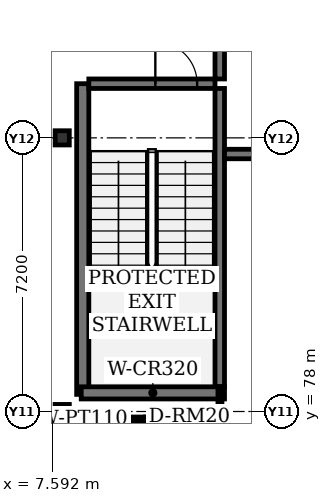
"""IFC4 building model, lengths in metres.
Left out: names, types, materials, properties, quantities, classifications, styles, units other than length and angle.
Written with IfcOpenShell. Run it as: python <this file> out.ifc"""

import sys

from ifc_helpers import new_model, si_unit, direction, frame, frame_2d, origin, origin_2d, place, context, subcontext, project, spatial, rectangle, i_section, extrude, element, fill, save


model = new_model("IFC4")
c1 = context("Model", 3, precision=1e-05, world=origin(), true_north=direction((0.0, 1.0)))
c2 = subcontext(c1, "Body", "Model", "MODEL_VIEW")
j1 = project(units=[si_unit("LENGTHUNIT", "METRE"), si_unit("PLANEANGLEUNIT", "RADIAN")], contexts=[c1])
p1 = place(None, origin())
s1 = spatial("IfcSite", under=j1, at=p1, CompositionType="ELEMENT")
p2 = place(p1, origin())
s2 = spatial("IfcBuilding", under=s1, at=p2, CompositionType="ELEMENT")
p3 = place(p2, frame((0.0, 0.0, 22.5)))
s3 = spatial("IfcBuildingStorey", under=s2, at=p3, CompositionType="ELEMENT", Elevation=22.5)
for number, where, z_axis, x_axis in (
    (1, (7.85, 78.0, 0.0), (0.0, 0.0, 1.0), (1.0, 0.0, 0.0)),
    (2, (7.85, 85.2, 0.0), (0.0, 0.0, 1.0), (0.0, 1.0, 0.0)),
):
    element("IfcColumn", number, at=place(p3, frame(where, z_axis=z_axis, x_axis=x_axis)), inside=s3, PredefinedType="COLUMN", context=c2, shape_type="SweptSolid", body=[
        extrude(i_section(OverallWidth=0.374, OverallDepth=0.372, WebThickness=0.016, FlangeThickness=0.026, FilletRadius=0.015, at=origin_2d()), origin(), (0.0, 0.0, 1.0), 4.2),
    ])
p4 = place(p3, frame((8.39, 78.45, 0.0), z_axis=(0.0, 0.0, 1.0), x_axis=(0.0, 1.0, 0.0)))
e3 = element("IfcWall", 3, at=p4, inside=s3, PredefinedType="SHEAR", context=c2, shape_type="SweptSolid", body=[
    extrude(rectangle(XDim=8.175, YDim=0.32, at=frame_2d((4.087, 0.0))), origin(), (0.0, 0.0, 1.0), 4.2),
])
p5 = place(p3, frame((11.995, 78.65, 0.0), z_axis=(0.0, 0.0, 1.0), x_axis=(0.0, 1.0, 0.0)))
e4 = element("IfcWall", 4, at=p5, inside=s3, PredefinedType="SHEAR", context=c2, shape_type="SweptSolid", body=[
    extrude(rectangle(XDim=7.85, YDim=0.25, at=frame_2d((3.925, 0.0))), origin(), (0.0, 0.0, 1.0), 4.2),
])
p6 = place(p3, frame((11.995, 86.75, 0.0), z_axis=(0.0, 0.0, 1.0), x_axis=(0.0, 1.0, 0.0)))
e5 = element("IfcWall", 5, at=p6, inside=s3, PredefinedType="SHEAR", context=c2, shape_type="SweptSolid", body=[
    extrude(rectangle(XDim=3.9, YDim=0.25, at=frame_2d((1.95, 0.0))), origin(), (0.0, 0.0, 1.0), 4.2),
])
p7 = place(p6, frame((1.3, 0.0, 0.0)))
e6 = element("IfcOpeningElement", 6, at=p7, cuts=e5, PredefinedType="OPENING", context=c2, shape_type="SweptSolid", body=[
    extrude(rectangle(XDim=1.25, YDim=2.2, at=frame_2d((0.625, 1.1))), frame((0.0, 0.125, 0.0), z_axis=(0.0, -1.0, 0.0), x_axis=(1.0, 0.0, 0.0)), (0.0, 0.0, 1.0), 0.25),
])
p8 = place(p3, frame((8.35, 78.49, 0.0), z_axis=(0.0, 0.0, 1.0), x_axis=(1.0, 0.0, 0.0)))
e7 = element("IfcWall", 7, at=p8, inside=s3, PredefinedType="SHEAR", context=c2, shape_type="SweptSolid", body=[
    extrude(rectangle(XDim=3.77, YDim=0.32, at=frame_2d((1.885, 0.0))), origin(), (0.0, 0.0, 1.0), 4.2),
])
p9 = place(p3, frame((8.55, 86.625, 0.0), z_axis=(0.0, 0.0, 1.0), x_axis=(1.0, 0.0, 0.0)))
e8 = element("IfcWall", 8, at=p9, inside=s3, PredefinedType="SHEAR", context=c2, shape_type="SweptSolid", body=[
    extrude(rectangle(XDim=3.32, YDim=0.25, at=frame_2d((1.66, 0.0))), origin(), (0.0, 0.0, 1.0), 4.2),
])
p10 = place(p9, frame((1.75, 0.0, 0.0)))
e9 = element("IfcOpeningElement", 9, at=p10, cuts=e8, PredefinedType="OPENING", context=c2, shape_type="SweptSolid", body=[
    extrude(rectangle(XDim=1.1, YDim=2.15, at=frame_2d((0.55, 1.075))), frame((0.0, 0.125, 0.0), z_axis=(0.0, -1.0, 0.0), x_axis=(1.0, 0.0, 0.0)), (0.0, 0.0, 1.0), 0.25),
])
p11 = place(p3, frame((12.12, 84.775, 0.0), z_axis=(0.0, 0.0, 1.0), x_axis=(1.0, 0.0, 0.0)))
e10 = element("IfcWall", 10, at=p11, inside=s3, PredefinedType="SHEAR", context=c2, shape_type="SweptSolid", body=[
    extrude(rectangle(XDim=4.03, YDim=0.25, at=frame_2d((2.015, 0.0))), origin(), (0.0, 0.0, 1.0), 4.2),
])
p12 = place(p11, frame((1.3, 0.0, 0.0)))
e11 = element("IfcOpeningElement", 11, at=p12, cuts=e10, PredefinedType="OPENING", context=c2, shape_type="SweptSolid", body=[
    extrude(rectangle(XDim=1.4, YDim=2.25, at=frame_2d((0.7, 1.125))), frame((0.0, 0.125, 0.0), z_axis=(0.0, -1.0, 0.0), x_axis=(1.0, 0.0, 0.0)), (0.0, 0.0, 1.0), 0.25),
])
p13 = place(p3, frame((8.032, 77.8, 0.0), z_axis=(0.0, 0.0, 1.0), x_axis=(1.0, 0.0, 0.0)))
e12 = element("IfcWall", 12, at=p13, inside=s3, PredefinedType="PARTITIONING", context=c2, shape_type="SweptSolid", body=[
    extrude(rectangle(XDim=3.968, YDim=0.11, at=frame_2d((1.984, 0.0))), origin(), (0.0, 0.0, 1.0), 3.277),
])
p14 = place(p3, frame((12.0, 77.8, 0.0), z_axis=(0.0, 0.0, 1.0), x_axis=(0.0, 1.0, 0.0)))
e13 = element("IfcWall", 13, at=p14, inside=s3, PredefinedType="PARTITIONING", context=c2, shape_type="SweptSolid", body=[
    extrude(rectangle(XDim=0.85, YDim=0.105, at=frame_2d((0.425, 0.0))), origin(), (0.0, 0.0, 1.0), 3.277),
])
p15 = place(p10, origin())
e14 = element("IfcDoor", 14, at=p15, inside=s3, OperationType="SINGLE_SWING_LEFT", PredefinedType="DOOR", context=c2, shape_type="SweptSolid", body=[
    extrude(rectangle(XDim=1.1, YDim=2.15, at=frame_2d((0.55, 1.075))), frame((0.0, 0.025, 0.0), z_axis=(0.0, -1.0, 0.0), x_axis=(1.0, 0.0, 0.0)), (0.0, 0.0, 1.0), 0.05),
])
fill(e9, e14)
save(model, sys.argv[1])
